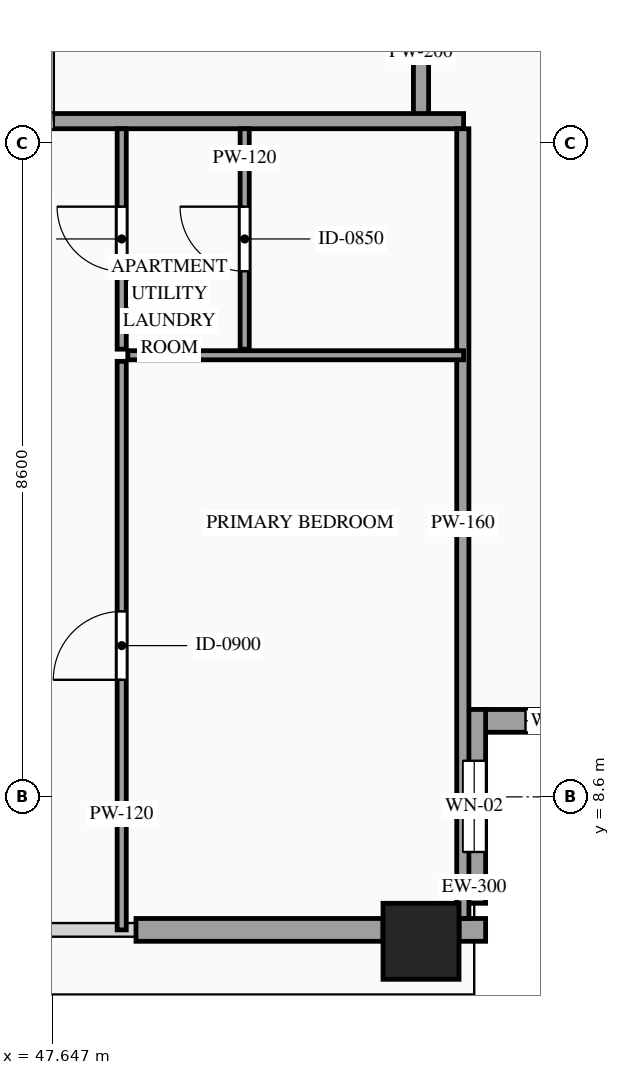
"""IFC4 building model, lengths in metres.
Left out: names, types, materials, properties, quantities, classifications, styles, units other than length and angle.
Written with IfcOpenShell. Run it as: python <this file> out.ifc"""

import sys

from ifc_helpers import new_model, si_unit, direction, frame, frame_2d, origin, origin_2d, place, context, subcontext, project, spatial, rectangle, hollow_rectangle, extrude, source, transform, mapped, element, fill, save


model = new_model("IFC4")
c1 = context("Model", 3, precision=1e-05, world=origin(), true_north=direction((0.0, 1.0)))
c2 = subcontext(c1, "Body", "Model", "MODEL_VIEW")
j1 = project(units=[si_unit("LENGTHUNIT", "METRE"), si_unit("PLANEANGLEUNIT", "RADIAN")], contexts=[c1])
p1 = place(None, origin())
s1 = spatial("IfcSite", under=j1, at=p1, CompositionType="ELEMENT")
p2 = place(p1, origin())
s2 = spatial("IfcBuilding", under=s1, at=p2, CompositionType="ELEMENT")
p3 = place(p2, frame((0.0, 0.0, 292.6)))
s3 = spatial("IfcBuildingStorey", under=s2, at=p3, CompositionType="ELEMENT", Elevation=292.6)
m1 = source(origin(), c2, "Body", "SweptSolid", [
    extrude(hollow_rectangle(XDim=1.0, YDim=1.0, WallThickness=0.048, at=origin_2d()), origin(), (0.0, 0.0, 1.0), 3.5),
])
p4 = place(p3, frame((52.5, 6.7, 0.0), z_axis=(0.0, 0.0, 1.0), x_axis=(1.0, 0.0, 0.0)))
e1 = element("IfcColumn", 1, at=p4, inside=s3, PredefinedType="COLUMN", context=c2, shape_type="MappedRepresentation", body=[
    mapped(m1, transform((0.0, 0.0, 0.0), scale=1.0)),
])
p5 = place(p3, frame((53.05, 9.6, 0.0), z_axis=(0.0, 0.0, 1.0), x_axis=(1.0, 0.0, 0.0)))
e2 = element("IfcWall", 2, at=p5, inside=s3, PredefinedType="SOLIDWALL", context=c2, shape_type="SweptSolid", body=[
    extrude(rectangle(XDim=2.55, YDim=0.3, at=frame_2d((1.275, 0.0))), origin(), (0.0, 0.0, 1.0), 3.28),
])
p6 = place(p5, frame((0.825, 0.0, 0.85)))
e3 = element("IfcOpeningElement", 3, at=p6, cuts=e2, PredefinedType="OPENING", context=c2, shape_type="SweptSolid", body=[
    extrude(rectangle(XDim=0.9, YDim=1.5, at=frame_2d((0.45, 0.75))), frame((0.0, 0.165, 0.0), z_axis=(0.0, -1.0, 0.0), x_axis=(1.0, 0.0, 0.0)), (0.0, 0.0, 1.0), 0.33),
])
p7 = place(p3, frame((53.2, 7.2, 0.0), z_axis=(0.0, 0.0, 1.0), x_axis=(0.0, 1.0, 0.0)))
e4 = element("IfcWall", 4, at=p7, inside=s3, PredefinedType="SOLIDWALL", context=c2, shape_type="SweptSolid", body=[
    extrude(rectangle(XDim=2.55, YDim=0.3, at=frame_2d((1.275, 0.0))), origin(), (0.0, 0.0, 1.0), 3.28),
])
p8 = place(p7, frame((0.675, 0.0, 0.85)))
e5 = element("IfcOpeningElement", 5, at=p8, cuts=e4, PredefinedType="OPENING", context=c2, shape_type="SweptSolid", body=[
    extrude(rectangle(XDim=1.2, YDim=2.1, at=frame_2d((0.6, 1.05))), frame((0.0, 0.165, 0.0), z_axis=(0.0, -1.0, 0.0), x_axis=(1.0, 0.0, 0.0)), (0.0, 0.0, 1.0), 0.33),
])
m2 = source(origin(), c2, "Body", "SweptSolid", [
    extrude(rectangle(XDim=0.35, YDim=0.3, at=frame_2d((0.175, 0.0))), origin(), (0.0, 0.0, 1.0), 3.28),
])
p9 = place(p3, frame((53.0, 6.85, 0.0), z_axis=(0.0, 0.0, 1.0), x_axis=(1.0, 0.0, 0.0)))
e6 = element("IfcWall", 6, at=p9, inside=s3, PredefinedType="SOLIDWALL", context=c2, shape_type="MappedRepresentation", body=[
    mapped(m2, transform((0.0, 0.0, 0.0), scale=1.0)),
])
m3 = source(origin(), c2, "Body", "SweptSolid", [
    extrude(rectangle(XDim=3.25, YDim=0.3, at=frame_2d((1.625, 0.0))), origin(), (0.0, 0.0, 1.0), 2.885),
])
p10 = place(p3, frame((48.75, 6.85, 0.0), z_axis=(0.0, 0.0, 1.0), x_axis=(1.0, 0.0, 0.0)))
e7 = element("IfcWall", 7, at=p10, inside=s3, PredefinedType="SOLIDWALL", context=c2, shape_type="MappedRepresentation", body=[
    mapped(m3, transform((0.0, 0.0, 0.0), scale=1.0)),
])
m4 = source(origin(), c2, "Body", "SweptSolid", [
    extrude(rectangle(XDim=1.7, YDim=0.2, at=frame_2d((0.85, 0.0))), origin(), (0.0, 0.0, 1.0), 3.28),
])
p11 = place(p3, frame((52.5, 17.55, 0.0), z_axis=(0.0, 0.0, 1.0), x_axis=(0.0, 1.0, 0.0)))
e8 = element("IfcWall", 8, at=p11, inside=s3, PredefinedType="PARTITIONING", context=c2, shape_type="MappedRepresentation", body=[
    mapped(m4, transform((0.0, 0.0, 0.0), scale=1.0)),
])
p12 = place(p3, frame((42.54, 17.49, 0.0), z_axis=(0.0, 0.0, 1.0), x_axis=(1.0, 0.0, 0.0)))
e9 = element("IfcWall", 9, at=p12, inside=s3, PredefinedType="PARTITIONING", context=c2, shape_type="SweptSolid", body=[
    extrude(rectangle(XDim=10.52, YDim=0.2, at=frame_2d((5.26, 0.0))), origin(), (0.0, 0.0, 1.0), 3.28),
])
p13 = place(p12, frame((4.129, 0.0, 0.0)))
e10 = element("IfcOpeningElement", 10, at=p13, cuts=e9, PredefinedType="OPENING", context=c2, shape_type="SweptSolid", body=[
    extrude(rectangle(XDim=1.0, YDim=2.2, at=frame_2d((0.5, 1.1))), frame((0.0, 0.115, 0.0), z_axis=(0.0, -1.0, 0.0), x_axis=(1.0, 0.0, 0.0)), (0.0, 0.0, 1.0), 0.23),
])
m5 = source(origin(), c2, "Body", "SweptSolid", [
    extrude(rectangle(XDim=10.39, YDim=0.16, at=frame_2d((5.195, 0.0))), origin(), (0.0, 0.0, 1.0), 3.28),
])
p14 = place(p3, frame((53.05, 7.0, 0.0), z_axis=(0.0, 0.0, 1.0), x_axis=(0.0, 1.0, 0.0)))
e11 = element("IfcWall", 11, at=p14, inside=s3, PredefinedType="PARTITIONING", context=c2, shape_type="MappedRepresentation", body=[
    mapped(m5, transform((0.0, 0.0, 0.0), scale=1.0)),
])
p15 = place(p3, frame((50.18, 14.49, 0.0), z_axis=(0.0, 0.0, 1.0), x_axis=(0.0, 1.0, 0.0)))
e12 = element("IfcWall", 12, at=p15, inside=s3, PredefinedType="PARTITIONING", context=c2, shape_type="SweptSolid", body=[
    extrude(rectangle(XDim=2.9, YDim=0.12, at=frame_2d((1.45, 0.0))), origin(), (0.0, 0.0, 1.0), 2.825),
])
p16 = place(p15, frame((1.025, 0.0, 0.0)))
e13 = element("IfcOpeningElement", 13, at=p16, cuts=e12, PredefinedType="OPENING", context=c2, shape_type="SweptSolid", body=[
    extrude(rectangle(XDim=0.85, YDim=2.1, at=frame_2d((0.425, 1.05))), frame((0.0, 0.075, 0.0), z_axis=(0.0, -1.0, 0.0), x_axis=(1.0, 0.0, 0.0)), (0.0, 0.0, 1.0), 0.15),
])
m6 = source(origin(), c2, "Body", "SweptSolid", [
    extrude(rectangle(XDim=4.418, YDim=0.12, at=frame_2d((2.209, 0.0))), origin(), (0.0, 0.0, 1.0), 3.28),
])
p17 = place(p3, frame((48.642, 14.41, 0.0), z_axis=(0.0, 0.0, 1.0), x_axis=(1.0, 0.0, 0.0)))
e14 = element("IfcWall", 14, at=p17, inside=s3, PredefinedType="PARTITIONING", context=c2, shape_type="MappedRepresentation", body=[
    mapped(m6, transform((0.0, 0.0, 0.0), scale=1.0)),
])
p18 = place(p3, frame((48.562, 6.85, 0.0), z_axis=(0.0, 0.0, 1.0), x_axis=(0.0, 1.0, 0.0)))
e15 = element("IfcWall", 15, at=p18, inside=s3, PredefinedType="PARTITIONING", context=c2, shape_type="SweptSolid", body=[
    extrude(rectangle(XDim=7.48, YDim=0.12, at=frame_2d((3.74, 0.0))), origin(), (0.0, 0.0, 1.0), 3.28),
])
p19 = place(p18, frame((3.29, 0.0, 0.0)))
e16 = element("IfcOpeningElement", 16, at=p19, cuts=e15, PredefinedType="OPENING", context=c2, shape_type="SweptSolid", body=[
    extrude(rectangle(XDim=0.9, YDim=2.15, at=frame_2d((0.45, 1.075))), frame((0.0, 0.075, 0.0), z_axis=(0.0, -1.0, 0.0), x_axis=(1.0, 0.0, 0.0)), (0.0, 0.0, 1.0), 0.15),
])
p20 = place(p3, frame((48.562, 14.49, 0.0), z_axis=(0.0, 0.0, 1.0), x_axis=(0.0, 1.0, 0.0)))
e17 = element("IfcWall", 17, at=p20, inside=s3, PredefinedType="PARTITIONING", context=c2, shape_type="SweptSolid", body=[
    extrude(rectangle(XDim=2.9, YDim=0.12, at=frame_2d((1.45, 0.0))), origin(), (0.0, 0.0, 1.0), 3.28),
])
p21 = place(p20, frame((1.025, 0.0, 0.0)))
e18 = element("IfcOpeningElement", 18, at=p21, cuts=e17, PredefinedType="OPENING", context=c2, shape_type="SweptSolid", body=[
    extrude(rectangle(XDim=0.85, YDim=2.1, at=frame_2d((0.425, 1.05))), frame((0.0, 0.075, 0.0), z_axis=(0.0, -1.0, 0.0), x_axis=(1.0, 0.0, 0.0)), (0.0, 0.0, 1.0), 0.15),
])
m7 = source(origin(), c2, "Body", "SweptSolid", [
    extrude(rectangle(XDim=0.9, YDim=1.5, at=frame_2d((0.45, 0.75))), frame((0.0, 0.03, 0.0), z_axis=(0.0, -1.0, 0.0), x_axis=(1.0, 0.0, 0.0)), (0.0, 0.0, 1.0), 0.06),
])
p22 = place(p6, origin())
e19 = element("IfcWindow", 19, at=p22, inside=s3, PartitioningType="SINGLE_PANEL", PredefinedType="WINDOW", context=c2, shape_type="MappedRepresentation", body=[
    mapped(m7, transform((0.0, 0.0, 0.0), scale=1.0)),
])
fill(e3, e19)
m8 = source(origin(), c2, "Body", "SweptSolid", [
    extrude(rectangle(XDim=1.2, YDim=2.1, at=frame_2d((0.6, 1.05))), frame((0.0, 0.03, 0.0), z_axis=(0.0, -1.0, 0.0), x_axis=(1.0, 0.0, 0.0)), (0.0, 0.0, 1.0), 0.06),
])
p23 = place(p8, origin())
e20 = element("IfcWindow", 20, at=p23, inside=s3, PartitioningType="SINGLE_PANEL", PredefinedType="WINDOW", context=c2, shape_type="MappedRepresentation", body=[
    mapped(m8, transform((0.0, 0.0, 0.0), scale=1.0)),
])
fill(e5, e20)
m9 = source(origin(), c2, "Body", "SweptSolid", [
    extrude(rectangle(XDim=1.0, YDim=2.2, at=frame_2d((0.5, 1.1))), frame((0.0, 0.025, 0.0), z_axis=(0.0, -1.0, 0.0), x_axis=(1.0, 0.0, 0.0)), (0.0, 0.0, 1.0), 0.05),
])
p24 = place(p13, origin())
e21 = element("IfcDoor", 21, at=p24, inside=s3, OperationType="SINGLE_SWING_RIGHT", PredefinedType="DOOR", context=c2, shape_type="MappedRepresentation", body=[
    mapped(m9, transform((0.0, 0.0, 0.0), scale=1.0)),
])
fill(e10, e21)
m10 = source(origin(), c2, "Body", "SweptSolid", [
    extrude(rectangle(XDim=0.85, YDim=2.1, at=frame_2d((0.425, 1.05))), frame((0.0, 0.025, 0.0), z_axis=(0.0, -1.0, 0.0), x_axis=(1.0, 0.0, 0.0)), (0.0, 0.0, 1.0), 0.05),
])
p25 = place(p16, origin())
e22 = element("IfcDoor", 22, at=p25, inside=s3, OperationType="SINGLE_SWING_RIGHT", PredefinedType="DOOR", context=c2, shape_type="MappedRepresentation", body=[
    mapped(m10, transform((0.0, 0.0, 0.0), scale=1.0)),
])
fill(e13, e22)
m11 = source(origin(), c2, "Body", "SweptSolid", [
    extrude(rectangle(XDim=0.9, YDim=2.15, at=frame_2d((0.45, 1.075))), frame((0.0, 0.025, 0.0), z_axis=(0.0, -1.0, 0.0), x_axis=(1.0, 0.0, 0.0)), (0.0, 0.0, 1.0), 0.05),
])
p26 = place(p19, origin())
e23 = element("IfcDoor", 23, at=p26, inside=s3, OperationType="SINGLE_SWING_LEFT", PredefinedType="DOOR", context=c2, shape_type="MappedRepresentation", body=[
    mapped(m11, transform((0.0, 0.0, 0.0), scale=1.0)),
])
fill(e16, e23)
p27 = place(p21, origin())
e24 = element("IfcDoor", 24, at=p27, inside=s3, OperationType="SINGLE_SWING_RIGHT", PredefinedType="DOOR", context=c2, shape_type="MappedRepresentation", body=[
    mapped(m10, transform((0.0, 0.0, 0.0), scale=1.0)),
])
fill(e18, e24)
save(model, sys.argv[1])
